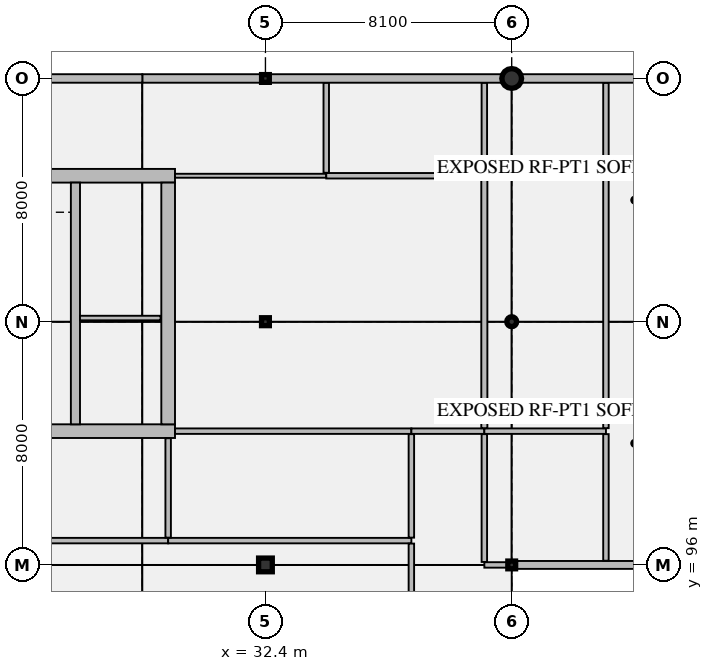
"""IFC4 building model, lengths in metres.
Left out: names, types, materials, properties, quantities, classifications, styles, units other than length and angle.
Written with IfcOpenShell. Run it as: python <this file> out.ifc"""

import sys

from ifc_helpers import new_model, si_unit, direction, frame, frame_2d, origin, origin_2d, place, context, subcontext, project, spatial, rectangle, hollow_rectangle, circle, hollow_circle, i_section, extrude, element, fill, save


model = new_model("IFC4")
c1 = context("Model", 3, precision=1e-05, world=origin(), true_north=direction((0.0, 1.0)))
c2 = subcontext(c1, "Body", "Model", "MODEL_VIEW")
j1 = project(units=[si_unit("LENGTHUNIT", "METRE"), si_unit("PLANEANGLEUNIT", "RADIAN")], contexts=[c1])
p1 = place(None, origin())
s1 = spatial("IfcSite", under=j1, at=p1, CompositionType="ELEMENT")
p2 = place(p1, origin())
s2 = spatial("IfcBuilding", under=s1, at=p2, CompositionType="ELEMENT")
p3 = place(p2, frame((0.0, 0.0, 33.3)))
s3 = spatial("IfcBuildingStorey", under=s2, at=p3, CompositionType="ELEMENT", Elevation=33.3)
p4 = place(p3, frame((16.36, 100.4, 0.0), z_axis=(0.0, 0.0, 1.0), x_axis=(1.0, 0.0, 0.0)))
e1 = element("IfcWall", 1, at=p4, inside=s3, PredefinedType="SHEAR", context=c2, shape_type="SweptSolid", body=[
    extrude(rectangle(XDim=13.065, YDim=0.45, at=frame_2d((6.532, 0.0))), origin(), (0.0, 0.0, 1.0), 3.98),
])
p5 = place(p4, frame((1.39, 0.0, 0.0)))
e2 = element("IfcOpeningElement", 2, at=p5, cuts=e1, PredefinedType="OPENING", context=c2, shape_type="SweptSolid", body=[
    extrude(rectangle(XDim=1.15, YDim=2.25, at=frame_2d((0.575, 1.125))), frame((0.0, 0.235, 0.0), z_axis=(0.0, -1.0, 0.0), x_axis=(1.0, 0.0, 0.0)), (0.0, 0.0, 1.0), 0.47),
])
p6 = place(p4, frame((10.695, 0.0, 0.0)))
e3 = element("IfcOpeningElement", 3, at=p6, cuts=e1, PredefinedType="OPENING", context=c2, shape_type="SweptSolid", body=[
    extrude(rectangle(XDim=1.1, YDim=2.2, at=frame_2d((0.55, 1.1))), frame((0.0, 0.235, 0.0), z_axis=(0.0, -1.0, 0.0), x_axis=(1.0, 0.0, 0.0)), (0.0, 0.0, 1.0), 0.47),
])
p7 = place(p3, frame((16.36, 108.8, 0.0), z_axis=(0.0, 0.0, 1.0), x_axis=(1.0, 0.0, 0.0)))
e4 = element("IfcWall", 4, at=p7, inside=s3, PredefinedType="SHEAR", context=c2, shape_type="SweptSolid", body=[
    extrude(rectangle(XDim=13.065, YDim=0.45, at=frame_2d((6.532, 0.0))), origin(), (0.0, 0.0, 1.0), 3.98),
])
p8 = place(p3, frame((29.2, 100.625, 0.0), z_axis=(0.0, 0.0, 1.0), x_axis=(0.0, 1.0, 0.0)))
e5 = element("IfcWall", 5, at=p8, inside=s3, PredefinedType="SHEAR", context=c2, shape_type="SweptSolid", body=[
    extrude(rectangle(XDim=7.95, YDim=0.45, at=frame_2d((3.975, 0.0))), origin(), (0.0, 0.0, 1.0), 3.98),
])
p9 = place(p3, frame((26.15, 100.625, 0.0), z_axis=(0.0, 0.0, 1.0), x_axis=(0.0, 1.0, 0.0)))
e6 = element("IfcWall", 6, at=p9, inside=s3, PredefinedType="SHEAR", context=c2, shape_type="SweptSolid", body=[
    extrude(rectangle(XDim=7.95, YDim=0.3, at=frame_2d((3.975, 0.0))), origin(), (0.0, 0.0, 1.0), 3.98),
])
p10 = place(p3, frame((32.4, 96.0, 0.0), z_axis=(0.0, 0.0, 1.0), x_axis=(1.0, 0.0, 0.0)))
e7 = element("IfcColumn", 7, at=p10, inside=s3, PredefinedType="COLUMN", context=c2, shape_type="SweptSolid", body=[
    extrude(rectangle(XDim=0.45, YDim=0.45, at=origin_2d()), origin(), (0.0, 0.0, 1.0), 3.98),
])
p11 = place(p3, frame((32.4, 104.0, 0.0), z_axis=(0.0, 0.0, 1.0), x_axis=(1.0, 0.0, 0.0)))
e8 = element("IfcColumn", 8, at=p11, inside=s3, PredefinedType="COLUMN", context=c2, shape_type="SweptSolid", body=[
    extrude(i_section(OverallWidth=0.256, OverallDepth=0.26, WebThickness=0.011, FlangeThickness=0.017, FilletRadius=0.013, at=origin_2d()), origin(), (0.0, 0.0, 1.0), 3.98),
])
for number, where, z_axis, x_axis in (
    (9, (32.4, 112.0, 0.0), (0.0, 0.0, 1.0), (1.0, 0.0, 0.0)),
    (10, (40.5, 96.0, 0.0), (0.0, 0.0, 1.0), (1.0, 0.0, 0.0)),
):
    element("IfcColumn", number, at=place(p3, frame(where, z_axis=z_axis, x_axis=x_axis)), inside=s3, PredefinedType="COLUMN", context=c2, shape_type="SweptSolid", body=[
        extrude(hollow_rectangle(XDim=0.254, YDim=0.254, WallThickness=0.013, InnerFilletRadius=0.013, OuterFilletRadius=0.025, at=origin_2d()), origin(), (0.0, 0.0, 1.0), 3.98),
    ])
p12 = place(p3, frame((40.5, 104.0, 0.0), z_axis=(0.0, 0.0, 1.0), x_axis=(1.0, 0.0, 0.0)))
e11 = element("IfcColumn", 11, at=p12, inside=s3, PredefinedType="COLUMN", context=c2, shape_type="SweptSolid", body=[
    extrude(hollow_circle(Radius=0.162, WallThickness=0.013, at=origin_2d()), origin(), (0.0, 0.0, 1.0), 3.98),
])
p13 = place(p3, frame((40.5, 112.0, 0.0), z_axis=(0.0, 0.0, 1.0), x_axis=(1.0, 0.0, 0.0)))
e12 = element("IfcColumn", 12, at=p13, inside=s3, PredefinedType="COLUMN", context=c2, shape_type="SweptSolid", body=[
    extrude(circle(Radius=0.325, at=origin_2d()), origin(), (0.0, 0.0, 1.0), 3.98),
])
p14 = place(p3, frame((40.68, 96.0, 0.0), z_axis=(0.0, 0.0, 1.0), x_axis=(1.0, 0.0, 0.0)))
e13 = element("IfcWall", 13, at=p14, inside=s3, PredefinedType="SOLIDWALL", context=c2, shape_type="SweptSolid", body=[
    extrude(rectangle(XDim=12.06, YDim=0.26, at=frame_2d((6.03, 0.0))), origin(), (0.0, 0.0, 1.0), 3.655),
])
p15 = place(p14, frame((3.6, 0.0, 0.95)))
e14 = element("IfcOpeningElement", 14, at=p15, cuts=e13, PredefinedType="OPENING", context=c2, shape_type="SweptSolid", body=[
    extrude(rectangle(XDim=1.2, YDim=1.8, at=frame_2d((0.6, 0.9))), frame((0.0, 0.14, 0.0), z_axis=(0.0, -1.0, 0.0), x_axis=(1.0, 0.0, 0.0)), (0.0, 0.0, 1.0), 0.28),
])
p16 = place(p3, frame((52.65, 112.0, 0.0), z_axis=(0.0, 0.0, 1.0), x_axis=(-1.0, 0.0, 0.0)))
e15 = element("IfcWall", 15, at=p16, inside=s3, PredefinedType="SOLIDWALL", context=c2, shape_type="SweptSolid", body=[
    extrude(rectangle(XDim=12.15, YDim=0.28, at=frame_2d((6.075, 0.0))), origin(), (0.0, 0.0, 1.0), 3.655),
])
p17 = place(p3, frame((40.5, 112.0, 0.0), z_axis=(0.0, 0.0, 1.0), x_axis=(-1.0, 0.0, 0.0)))
e16 = element("IfcWall", 16, at=p17, inside=s3, PredefinedType="SOLIDWALL", context=c2, shape_type="SweptSolid", body=[
    extrude(rectangle(XDim=12.15, YDim=0.28, at=frame_2d((6.075, 0.0))), origin(), (0.0, 0.0, 1.0), 3.655),
])
p18 = place(p17, frame((3.6, 0.0, 0.85)))
e17 = element("IfcOpeningElement", 17, at=p18, cuts=e16, PredefinedType="OPENING", context=c2, shape_type="SweptSolid", body=[
    extrude(rectangle(XDim=1.35, YDim=2.1, at=frame_2d((0.675, 1.05))), frame((0.0, 0.15, 0.0), z_axis=(0.0, -1.0, 0.0), x_axis=(1.0, 0.0, 0.0)), (0.0, 0.0, 1.0), 0.3),
])
p19 = place(p3, frame((28.35, 112.0, 0.0), z_axis=(0.0, 0.0, 1.0), x_axis=(-1.0, 0.0, 0.0)))
e18 = element("IfcWall", 18, at=p19, inside=s3, PredefinedType="SOLIDWALL", context=c2, shape_type="SweptSolid", body=[
    extrude(rectangle(XDim=12.15, YDim=0.28, at=frame_2d((6.075, 0.0))), origin(), (0.0, 0.0, 1.0), 3.655),
])
p20 = place(p19, frame((5.4, 0.0, 0.95)))
e19 = element("IfcOpeningElement", 19, at=p20, cuts=e18, PredefinedType="OPENING", context=c2, shape_type="SweptSolid", body=[
    extrude(rectangle(XDim=1.5, YDim=1.8, at=frame_2d((0.75, 0.9))), frame((0.0, 0.15, 0.0), z_axis=(0.0, -1.0, 0.0), x_axis=(1.0, 0.0, 0.0)), (0.0, 0.0, 1.0), 0.3),
])
p21 = place(p3, frame((26.3, 104.12, 0.0), z_axis=(0.0, 0.0, 1.0), x_axis=(1.0, 0.0, 0.0)))
e20 = element("IfcWall", 20, at=p21, inside=s3, PredefinedType="PARTITIONING", context=c2, shape_type="SweptSolid", body=[
    extrude(rectangle(XDim=2.65, YDim=0.15, at=frame_2d((1.325, 0.0))), origin(), (0.0, 0.0, 1.0), 3.98),
])
p22 = place(p3, frame((22.774, 96.8, 0.0), z_axis=(0.0, 0.0, 1.0), x_axis=(1.0, 0.0, 0.0)))
e21 = element("IfcWall", 21, at=p22, inside=s3, PredefinedType="PARTITIONING", context=c2, shape_type="SweptSolid", body=[
    extrude(rectangle(XDim=6.426, YDim=0.18, at=frame_2d((3.213, 0.0))), origin(), (0.0, 0.0, 1.0), 3.98),
])
p23 = place(p3, frame((29.2, 96.8, 0.0), z_axis=(0.0, 0.0, 1.0), x_axis=(1.0, 0.0, 0.0)))
e22 = element("IfcWall", 22, at=p23, inside=s3, PredefinedType="PARTITIONING", context=c2, shape_type="SweptSolid", body=[
    extrude(rectangle(XDim=8.0, YDim=0.18, at=frame_2d((4.0, 0.0))), origin(), (0.0, 0.0, 1.0), 3.98),
])
p24 = place(p3, frame((29.425, 100.4, 0.0), z_axis=(0.0, 0.0, 1.0), x_axis=(1.0, 0.0, 0.0)))
e23 = element("IfcWall", 23, at=p24, inside=s3, PredefinedType="PARTITIONING", context=c2, shape_type="SweptSolid", body=[
    extrude(rectangle(XDim=7.775, YDim=0.18, at=frame_2d((3.887, 0.0))), origin(), (0.0, 0.0, 1.0), 3.98),
])
p25 = place(p24, frame((3.387, 0.0, 0.0)))
e24 = element("IfcOpeningElement", 24, at=p25, cuts=e23, PredefinedType="OPENING", context=c2, shape_type="SweptSolid", body=[
    extrude(rectangle(XDim=1.0, YDim=2.2, at=frame_2d((0.5, 1.1))), frame((0.0, 0.1, 0.0), z_axis=(0.0, -1.0, 0.0), x_axis=(1.0, 0.0, 0.0)), (0.0, 0.0, 1.0), 0.2),
])
p26 = place(p3, frame((29.425, 108.8, 0.0), z_axis=(0.0, 0.0, 1.0), x_axis=(1.0, 0.0, 0.0)))
e25 = element("IfcWall", 25, at=p26, inside=s3, PredefinedType="PARTITIONING", context=c2, shape_type="SweptSolid", body=[
    extrude(rectangle(XDim=4.975, YDim=0.13, at=frame_2d((2.487, 0.0))), origin(), (0.0, 0.0, 1.0), 3.98),
])
p27 = place(p26, frame((1.988, 0.0, 0.0)))
e26 = element("IfcOpeningElement", 26, at=p27, cuts=e25, PredefinedType="OPENING", context=c2, shape_type="SweptSolid", body=[
    extrude(rectangle(XDim=1.0, YDim=2.2, at=frame_2d((0.5, 1.1))), frame((0.0, 0.075, 0.0), z_axis=(0.0, -1.0, 0.0), x_axis=(1.0, 0.0, 0.0)), (0.0, 0.0, 1.0), 0.15),
])
p28 = place(p3, frame((34.4, 108.8, 0.0), z_axis=(0.0, 0.0, 1.0), x_axis=(1.0, 0.0, 0.0)))
e27 = element("IfcWall", 27, at=p28, inside=s3, PredefinedType="PARTITIONING", context=c2, shape_type="SweptSolid", body=[
    extrude(rectangle(XDim=5.2, YDim=0.18, at=frame_2d((2.6, 0.0))), origin(), (0.0, 0.0, 1.0), 3.98),
])
p29 = place(p28, frame((2.1, 0.0, 0.0)))
e28 = element("IfcOpeningElement", 28, at=p29, cuts=e27, PredefinedType="OPENING", context=c2, shape_type="SweptSolid", body=[
    extrude(rectangle(XDim=1.0, YDim=2.15, at=frame_2d((0.5, 1.075))), frame((0.0, 0.1, 0.0), z_axis=(0.0, -1.0, 0.0), x_axis=(1.0, 0.0, 0.0)), (0.0, 0.0, 1.0), 0.2),
])
p30 = place(p3, frame((37.2, 100.4, 0.0), z_axis=(0.0, 0.0, 1.0), x_axis=(1.0, 0.0, 0.0)))
e29 = element("IfcWall", 29, at=p30, inside=s3, PredefinedType="PARTITIONING", context=c2, shape_type="SweptSolid", body=[
    extrude(rectangle(XDim=2.4, YDim=0.18, at=frame_2d((1.2, 0.0))), origin(), (0.0, 0.0, 1.0), 3.98),
])
p31 = place(p3, frame((39.6, 96.0, 0.0), z_axis=(0.0, 0.0, 1.0), x_axis=(1.0, 0.0, 0.0)))
e30 = element("IfcWall", 30, at=p31, inside=s3, PredefinedType="PARTITIONING", context=c2, shape_type="SweptSolid", body=[
    extrude(rectangle(XDim=0.765, YDim=0.18, at=frame_2d((0.382, 0.0))), origin(), (0.0, 0.0, 1.0), 3.655),
])
p32 = place(p3, frame((39.6, 100.4, 0.0), z_axis=(0.0, 0.0, 1.0), x_axis=(1.0, 0.0, 0.0)))
e31 = element("IfcWall", 31, at=p32, inside=s3, PredefinedType="PARTITIONING", context=c2, shape_type="SweptSolid", body=[
    extrude(rectangle(XDim=4.0, YDim=0.18, at=frame_2d((2.0, 0.0))), origin(), (0.0, 0.0, 1.0), 3.98),
])
p33 = place(p3, frame((29.2, 96.898, 0.0), z_axis=(0.0, 0.0, 1.0), x_axis=(0.0, 1.0, 0.0)))
e32 = element("IfcWall", 32, at=p33, inside=s3, PredefinedType="PARTITIONING", context=c2, shape_type="SweptSolid", body=[
    extrude(rectangle(XDim=3.269, YDim=0.18, at=frame_2d((1.635, 0.0))), origin(), (0.0, 0.0, 1.0), 3.98),
])
p34 = place(p33, frame((1.034, 0.0, 0.0)))
e33 = element("IfcOpeningElement", 33, at=p34, cuts=e32, PredefinedType="OPENING", context=c2, shape_type="SweptSolid", body=[
    extrude(rectangle(XDim=1.2, YDim=2.2, at=frame_2d((0.6, 1.1))), frame((0.0, 0.1, 0.0), z_axis=(0.0, -1.0, 0.0), x_axis=(1.0, 0.0, 0.0)), (0.0, 0.0, 1.0), 0.2),
])
p35 = place(p3, frame((34.4, 108.898, 0.0), z_axis=(0.0, 0.0, 1.0), x_axis=(0.0, 1.0, 0.0)))
e34 = element("IfcWall", 34, at=p35, inside=s3, PredefinedType="PARTITIONING", context=c2, shape_type="SweptSolid", body=[
    extrude(rectangle(XDim=2.954, YDim=0.18, at=frame_2d((1.477, 0.0))), origin(), (0.0, 0.0, 1.0), 3.98),
])
p36 = place(p3, frame((37.2, 92.908, 0.0), z_axis=(0.0, 0.0, 1.0), x_axis=(0.0, 1.0, 0.0)))
e35 = element("IfcWall", 35, at=p36, inside=s3, PredefinedType="PARTITIONING", context=c2, shape_type="SweptSolid", body=[
    extrude(rectangle(XDim=3.794, YDim=0.18, at=frame_2d((1.897, 0.0))), origin(), (0.0, 0.0, 1.0), 3.98),
])
p37 = place(p36, frame((1.397, 0.0, 0.0)))
e36 = element("IfcOpeningElement", 36, at=p37, cuts=e35, PredefinedType="OPENING", context=c2, shape_type="SweptSolid", body=[
    extrude(rectangle(XDim=1.0, YDim=2.2, at=frame_2d((0.5, 1.1))), frame((0.0, 0.1, 0.0), z_axis=(0.0, -1.0, 0.0), x_axis=(1.0, 0.0, 0.0)), (0.0, 0.0, 1.0), 0.2),
])
p38 = place(p3, frame((37.2, 96.898, 0.0), z_axis=(0.0, 0.0, 1.0), x_axis=(0.0, 1.0, 0.0)))
e37 = element("IfcWall", 37, at=p38, inside=s3, PredefinedType="PARTITIONING", context=c2, shape_type="SweptSolid", body=[
    extrude(rectangle(XDim=3.404, YDim=0.18, at=frame_2d((1.702, 0.0))), origin(), (0.0, 0.0, 1.0), 3.98),
])
p39 = place(p38, frame((1.152, 0.0, 0.0)))
e38 = element("IfcOpeningElement", 38, at=p39, cuts=e37, PredefinedType="OPENING", context=c2, shape_type="SweptSolid", body=[
    extrude(rectangle(XDim=1.1, YDim=2.2, at=frame_2d((0.55, 1.1))), frame((0.0, 0.1, 0.0), z_axis=(0.0, -1.0, 0.0), x_axis=(1.0, 0.0, 0.0)), (0.0, 0.0, 1.0), 0.2),
])
p40 = place(p3, frame((39.6, 96.098, 0.0), z_axis=(0.0, 0.0, 1.0), x_axis=(0.0, 1.0, 0.0)))
e39 = element("IfcWall", 39, at=p40, inside=s3, PredefinedType="PARTITIONING", context=c2, shape_type="SweptSolid", body=[
    extrude(rectangle(XDim=4.204, YDim=0.18, at=frame_2d((2.102, 0.0))), origin(), (0.0, 0.0, 1.0), 3.98),
])
p41 = place(p40, frame((1.552, 0.0, 0.0)))
e40 = element("IfcOpeningElement", 40, at=p41, cuts=e39, PredefinedType="OPENING", context=c2, shape_type="SweptSolid", body=[
    extrude(rectangle(XDim=1.1, YDim=2.2, at=frame_2d((0.55, 1.1))), frame((0.0, 0.1, 0.0), z_axis=(0.0, -1.0, 0.0), x_axis=(1.0, 0.0, 0.0)), (0.0, 0.0, 1.0), 0.2),
])
p42 = place(p3, frame((39.6, 100.498, 0.0), z_axis=(0.0, 0.0, 1.0), x_axis=(0.0, 1.0, 0.0)))
e41 = element("IfcWall", 41, at=p42, inside=s3, PredefinedType="PARTITIONING", context=c2, shape_type="SweptSolid", body=[
    extrude(rectangle(XDim=8.204, YDim=0.2, at=frame_2d((4.102, 0.0))), origin(), (0.0, 0.0, 1.0), 3.98),
])
p43 = place(p3, frame((39.6, 108.898, 0.0), z_axis=(0.0, 0.0, 1.0), x_axis=(0.0, 1.0, 0.0)))
e42 = element("IfcWall", 42, at=p43, inside=s3, PredefinedType="PARTITIONING", context=c2, shape_type="SweptSolid", body=[
    extrude(rectangle(XDim=2.954, YDim=0.18, at=frame_2d((1.477, 0.0))), origin(), (0.0, 0.0, 1.0), 3.98),
])
p44 = place(p3, frame((43.6, 96.138, 0.0), z_axis=(0.0, 0.0, 1.0), x_axis=(0.0, 1.0, 0.0)))
e43 = element("IfcWall", 43, at=p44, inside=s3, PredefinedType="PARTITIONING", context=c2, shape_type="SweptSolid", body=[
    extrude(rectangle(XDim=4.164, YDim=0.18, at=frame_2d((2.082, 0.0))), origin(), (0.0, 0.0, 1.0), 3.98),
])
p45 = place(p44, frame((1.532, 0.0, 0.0)))
e44 = element("IfcOpeningElement", 44, at=p45, cuts=e43, PredefinedType="OPENING", context=c2, shape_type="SweptSolid", body=[
    extrude(rectangle(XDim=1.1, YDim=2.2, at=frame_2d((0.55, 1.1))), frame((0.0, 0.1, 0.0), z_axis=(0.0, -1.0, 0.0), x_axis=(1.0, 0.0, 0.0)), (0.0, 0.0, 1.0), 0.2),
])
p46 = place(p3, frame((43.6, 100.498, 0.0), z_axis=(0.0, 0.0, 1.0), x_axis=(0.0, 1.0, 0.0)))
e45 = element("IfcWall", 45, at=p46, inside=s3, PredefinedType="PARTITIONING", context=c2, shape_type="SweptSolid", body=[
    extrude(rectangle(XDim=11.354, YDim=0.18, at=frame_2d((5.677, 0.0))), origin(), (0.0, 0.0, 1.0), 3.98),
])
p47 = place(p46, frame((5.127, 0.0, 0.0)))
e46 = element("IfcOpeningElement", 46, at=p47, cuts=e45, PredefinedType="OPENING", context=c2, shape_type="SweptSolid", body=[
    extrude(rectangle(XDim=1.1, YDim=2.2, at=frame_2d((0.55, 1.1))), frame((0.0, 0.1, 0.0), z_axis=(0.0, -1.0, 0.0), x_axis=(1.0, 0.0, 0.0)), (0.0, 0.0, 1.0), 0.2),
])
p48 = place(p15, origin())
e47 = element("IfcWindow", 47, at=p48, inside=s3, PartitioningType="SINGLE_PANEL", PredefinedType="WINDOW", context=c2, shape_type="SweptSolid", body=[
    extrude(rectangle(XDim=1.2, YDim=1.8, at=frame_2d((0.6, 0.9))), frame((0.0, 0.03, 0.0), z_axis=(0.0, -1.0, 0.0), x_axis=(1.0, 0.0, 0.0)), (0.0, 0.0, 1.0), 0.06),
])
fill(e14, e47)
p49 = place(p18, origin())
e48 = element("IfcWindow", 48, at=p49, inside=s3, PartitioningType="DOUBLE_PANEL_VERTICAL", PredefinedType="WINDOW", context=c2, shape_type="SweptSolid", body=[
    extrude(rectangle(XDim=1.35, YDim=2.1, at=frame_2d((0.675, 1.05))), frame((0.0, 0.03, 0.0), z_axis=(0.0, -1.0, 0.0), x_axis=(1.0, 0.0, 0.0)), (0.0, 0.0, 1.0), 0.06),
])
fill(e17, e48)
p50 = place(p6, frame((1.1, 0.0, 0.0), z_axis=(0.0, 0.0, 1.0), x_axis=(-1.0, 0.0, 0.0)))
e49 = element("IfcDoor", 49, at=p50, inside=s3, OperationType="DOUBLE_DOOR_SLIDING", PredefinedType="DOOR", context=c2, shape_type="SweptSolid", body=[
    extrude(rectangle(XDim=1.1, YDim=2.2, at=frame_2d((0.55, 1.1))), frame((0.0, 0.025, 0.0), z_axis=(0.0, -1.0, 0.0), x_axis=(1.0, 0.0, 0.0)), (0.0, 0.0, 1.0), 0.05),
])
fill(e3, e49)
p51 = place(p25, origin())
e50 = element("IfcDoor", 50, at=p51, inside=s3, OperationType="SINGLE_SWING_RIGHT", PredefinedType="DOOR", context=c2, shape_type="SweptSolid", body=[
    extrude(rectangle(XDim=1.0, YDim=2.2, at=frame_2d((0.5, 1.1))), frame((0.0, 0.025, 0.0), z_axis=(0.0, -1.0, 0.0), x_axis=(1.0, 0.0, 0.0)), (0.0, 0.0, 1.0), 0.05),
])
fill(e24, e50)
p52 = place(p27, origin())
e51 = element("IfcDoor", 51, at=p52, inside=s3, OperationType="SINGLE_SWING_LEFT", PredefinedType="DOOR", context=c2, shape_type="SweptSolid", body=[
    extrude(rectangle(XDim=1.0, YDim=2.2, at=frame_2d((0.5, 1.1))), frame((0.0, 0.025, 0.0), z_axis=(0.0, -1.0, 0.0), x_axis=(1.0, 0.0, 0.0)), (0.0, 0.0, 1.0), 0.05),
])
fill(e26, e51)
p53 = place(p29, origin())
e52 = element("IfcDoor", 52, at=p53, inside=s3, OperationType="SINGLE_SWING_RIGHT", PredefinedType="DOOR", context=c2, shape_type="SweptSolid", body=[
    extrude(rectangle(XDim=1.0, YDim=2.15, at=frame_2d((0.5, 1.075))), frame((0.0, 0.025, 0.0), z_axis=(0.0, -1.0, 0.0), x_axis=(1.0, 0.0, 0.0)), (0.0, 0.0, 1.0), 0.05),
])
fill(e28, e52)
p54 = place(p34, frame((1.2, 0.0, 0.0), z_axis=(0.0, 0.0, 1.0), x_axis=(-1.0, 0.0, 0.0)))
e53 = element("IfcDoor", 53, at=p54, inside=s3, OperationType="SINGLE_SWING_RIGHT", PredefinedType="DOOR", context=c2, shape_type="SweptSolid", body=[
    extrude(rectangle(XDim=1.2, YDim=2.2, at=frame_2d((0.6, 1.1))), frame((0.0, 0.025, 0.0), z_axis=(0.0, -1.0, 0.0), x_axis=(1.0, 0.0, 0.0)), (0.0, 0.0, 1.0), 0.05),
])
fill(e33, e53)
p55 = place(p37, origin())
e54 = element("IfcDoor", 54, at=p55, inside=s3, OperationType="SINGLE_SWING_LEFT", PredefinedType="DOOR", context=c2, shape_type="SweptSolid", body=[
    extrude(rectangle(XDim=1.0, YDim=2.2, at=frame_2d((0.5, 1.1))), frame((0.0, 0.025, 0.0), z_axis=(0.0, -1.0, 0.0), x_axis=(1.0, 0.0, 0.0)), (0.0, 0.0, 1.0), 0.05),
])
fill(e36, e54)
p56 = place(p39, origin())
e55 = element("IfcDoor", 55, at=p56, inside=s3, OperationType="SINGLE_SWING_RIGHT", PredefinedType="DOOR", context=c2, shape_type="SweptSolid", body=[
    extrude(rectangle(XDim=1.1, YDim=2.2, at=frame_2d((0.55, 1.1))), frame((0.0, 0.025, 0.0), z_axis=(0.0, -1.0, 0.0), x_axis=(1.0, 0.0, 0.0)), (0.0, 0.0, 1.0), 0.05),
])
fill(e38, e55)
p57 = place(p41, frame((1.1, 0.0, 0.0), z_axis=(0.0, 0.0, 1.0), x_axis=(-1.0, 0.0, 0.0)))
e56 = element("IfcDoor", 56, at=p57, inside=s3, OperationType="SINGLE_SWING_LEFT", PredefinedType="DOOR", context=c2, shape_type="SweptSolid", body=[
    extrude(rectangle(XDim=1.1, YDim=2.2, at=frame_2d((0.55, 1.1))), frame((0.0, 0.025, 0.0), z_axis=(0.0, -1.0, 0.0), x_axis=(1.0, 0.0, 0.0)), (0.0, 0.0, 1.0), 0.05),
])
fill(e40, e56)
p58 = place(p45, origin())
e57 = element("IfcDoor", 57, at=p58, inside=s3, OperationType="SINGLE_SWING_RIGHT", PredefinedType="DOOR", context=c2, shape_type="SweptSolid", body=[
    extrude(rectangle(XDim=1.1, YDim=2.2, at=frame_2d((0.55, 1.1))), frame((0.0, 0.025, 0.0), z_axis=(0.0, -1.0, 0.0), x_axis=(1.0, 0.0, 0.0)), (0.0, 0.0, 1.0), 0.05),
])
fill(e44, e57)
p59 = place(p47, origin())
e58 = element("IfcDoor", 58, at=p59, inside=s3, OperationType="SINGLE_SWING_LEFT", PredefinedType="DOOR", context=c2, shape_type="SweptSolid", body=[
    extrude(rectangle(XDim=1.1, YDim=2.2, at=frame_2d((0.55, 1.1))), frame((0.0, 0.025, 0.0), z_axis=(0.0, -1.0, 0.0), x_axis=(1.0, 0.0, 0.0)), (0.0, 0.0, 1.0), 0.05),
])
fill(e46, e58)
save(model, sys.argv[1])
